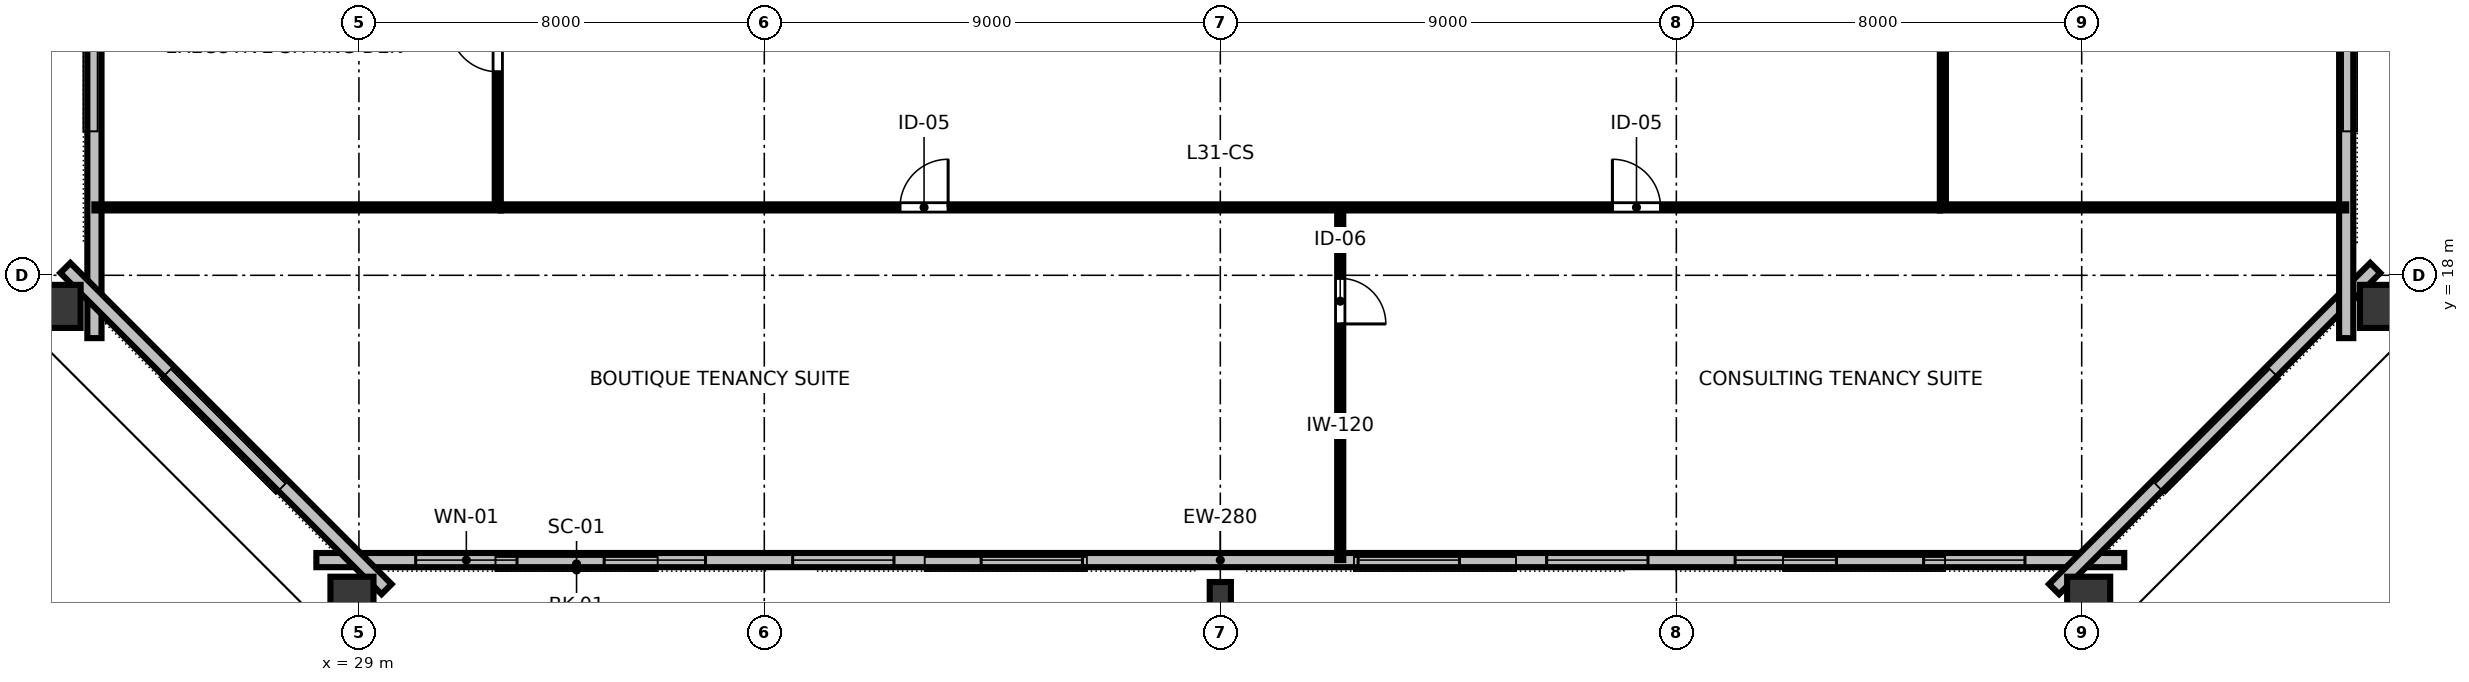
"""IFC4 building model, lengths in metres.
Left out: names, types, materials, properties, quantities, classifications, styles, units other than length and angle.
Written with IfcOpenShell. Run it as: python <this file> out.ifc"""

import sys

from ifc_helpers import new_model, si_unit, direction, frame, frame_2d, origin, origin_2d, place, context, subcontext, project, spatial, rectangle, hollow_rectangle, i_section, extrude, element, fill, save


model = new_model("IFC4")
c1 = context("Model", 3, precision=1e-05, world=origin(), true_north=direction((0.0, 1.0)))
c2 = subcontext(c1, "Body", "Model", "MODEL_VIEW")
j1 = project(units=[si_unit("LENGTHUNIT", "METRE"), si_unit("PLANEANGLEUNIT", "RADIAN")], contexts=[c1])
p1 = place(None, origin())
s1 = spatial("IfcSite", under=j1, at=p1, CompositionType="ELEMENT")
p2 = place(p1, origin())
s2 = spatial("IfcBuilding", under=s1, at=p2, CompositionType="ELEMENT")
p3 = place(p2, frame((0.0, 0.0, 120.4)))
s3 = spatial("IfcBuildingStorey", under=s2, at=p3, CompositionType="ELEMENT", Elevation=120.4)
p4 = place(p3, frame((28.863, 11.552, 0.0), z_axis=(0.0, 0.0, 1.0), x_axis=(1.0, 0.0, 0.0)))
e1 = element("IfcColumn", 1, at=p4, inside=s3, PredefinedType="COLUMN", context=c2, shape_type="SweptSolid", body=[
    extrude(hollow_rectangle(XDim=0.85, YDim=1.0, WallThickness=0.05, at=origin_2d()), origin(), (0.0, 0.0, 1.0), 3.358),
])
p5 = place(p3, frame((46.0, 11.72, 0.0), z_axis=(0.0, 0.0, 1.0), x_axis=(1.0, 0.0, 0.0)))
e2 = element("IfcColumn", 2, at=p5, inside=s3, PredefinedType="COLUMN", context=c2, shape_type="SweptSolid", body=[
    extrude(i_section(OverallWidth=0.418, OverallDepth=0.455, WebThickness=0.042, FlangeThickness=0.068, FilletRadius=0.025, at=origin_2d()), origin(), (0.0, 0.0, 1.0), 3.358),
])
for number, where, z_axis, x_axis in (
    (3, (63.137, 11.552, 0.0), (0.0, 0.0, 1.0), (1.0, 0.0, 0.0)),
    (4, (68.992, 17.386, 0.0), (0.0, 0.0, 1.0), (0.0, 1.0, 0.0)),
    (5, (23.008, 17.386, 0.0), (0.0, 0.0, 1.0), (0.0, 1.0, 0.0)),
):
    element("IfcColumn", number, at=place(p3, frame(where, z_axis=z_axis, x_axis=x_axis)), inside=s3, PredefinedType="COLUMN", context=c2, shape_type="SweptSolid", body=[
        extrude(hollow_rectangle(XDim=0.85, YDim=1.0, WallThickness=0.05, at=origin_2d()), origin(), (0.0, 0.0, 1.0), 3.358),
    ])
p6 = place(p3, frame((28.16, 12.38, 0.0), z_axis=(0.0, 0.0, 1.0), x_axis=(1.0, 0.0, 0.0)))
e6 = element("IfcWall", 6, at=p6, inside=s3, PredefinedType="STANDARD", context=c2, shape_type="SweptSolid", body=[
    extrude(rectangle(XDim=35.68, YDim=0.28, at=frame_2d((17.84, 0.0))), origin(), (0.0, 0.0, 1.0), 3.36),
])
p7 = place(p6, frame((1.96, 0.0, 0.8)))
e7 = element("IfcOpeningElement", 7, at=p7, cuts=e6, PredefinedType="OPENING", context=c2, shape_type="SweptSolid", body=[
    extrude(rectangle(XDim=2.0, YDim=1.95, at=frame_2d((1.0, 0.975))), frame((0.0, 0.15, 0.0), z_axis=(0.0, -1.0, 0.0), x_axis=(1.0, 0.0, 0.0)), (0.0, 0.0, 1.0), 0.3),
])
p8 = place(p6, frame((5.68, 0.0, 0.8)))
e8 = element("IfcOpeningElement", 8, at=p8, cuts=e6, PredefinedType="OPENING", context=c2, shape_type="SweptSolid", body=[
    extrude(rectangle(XDim=2.0, YDim=1.95, at=frame_2d((1.0, 0.975))), frame((0.0, 0.15, 0.0), z_axis=(0.0, -1.0, 0.0), x_axis=(1.0, 0.0, 0.0)), (0.0, 0.0, 1.0), 0.3),
])
p9 = place(p6, frame((9.4, 0.0, 0.8)))
e9 = element("IfcOpeningElement", 9, at=p9, cuts=e6, PredefinedType="OPENING", context=c2, shape_type="SweptSolid", body=[
    extrude(rectangle(XDim=2.0, YDim=1.95, at=frame_2d((1.0, 0.975))), frame((0.0, 0.15, 0.0), z_axis=(0.0, -1.0, 0.0), x_axis=(1.0, 0.0, 0.0)), (0.0, 0.0, 1.0), 0.3),
])
p10 = place(p6, frame((13.12, 0.0, 0.8)))
e10 = element("IfcOpeningElement", 10, at=p10, cuts=e6, PredefinedType="OPENING", context=c2, shape_type="SweptSolid", body=[
    extrude(rectangle(XDim=2.0, YDim=1.95, at=frame_2d((1.0, 0.975))), frame((0.0, 0.15, 0.0), z_axis=(0.0, -1.0, 0.0), x_axis=(1.0, 0.0, 0.0)), (0.0, 0.0, 1.0), 0.3),
])
p11 = place(p6, frame((20.56, 0.0, 0.8)))
e11 = element("IfcOpeningElement", 11, at=p11, cuts=e6, PredefinedType="OPENING", context=c2, shape_type="SweptSolid", body=[
    extrude(rectangle(XDim=2.0, YDim=1.95, at=frame_2d((1.0, 0.975))), frame((0.0, 0.15, 0.0), z_axis=(0.0, -1.0, 0.0), x_axis=(1.0, 0.0, 0.0)), (0.0, 0.0, 1.0), 0.3),
])
p12 = place(p6, frame((24.28, 0.0, 0.8)))
e12 = element("IfcOpeningElement", 12, at=p12, cuts=e6, PredefinedType="OPENING", context=c2, shape_type="SweptSolid", body=[
    extrude(rectangle(XDim=2.0, YDim=1.95, at=frame_2d((1.0, 0.975))), frame((0.0, 0.15, 0.0), z_axis=(0.0, -1.0, 0.0), x_axis=(1.0, 0.0, 0.0)), (0.0, 0.0, 1.0), 0.3),
])
p13 = place(p6, frame((28.0, 0.0, 0.8)))
e13 = element("IfcOpeningElement", 13, at=p13, cuts=e6, PredefinedType="OPENING", context=c2, shape_type="SweptSolid", body=[
    extrude(rectangle(XDim=2.0, YDim=1.95, at=frame_2d((1.0, 0.975))), frame((0.0, 0.15, 0.0), z_axis=(0.0, -1.0, 0.0), x_axis=(1.0, 0.0, 0.0)), (0.0, 0.0, 1.0), 0.3),
])
p14 = place(p6, frame((31.72, 0.0, 0.8)))
e14 = element("IfcOpeningElement", 14, at=p14, cuts=e6, PredefinedType="OPENING", context=c2, shape_type="SweptSolid", body=[
    extrude(rectangle(XDim=2.0, YDim=1.95, at=frame_2d((1.0, 0.975))), frame((0.0, 0.15, 0.0), z_axis=(0.0, -1.0, 0.0), x_axis=(1.0, 0.0, 0.0)), (0.0, 0.0, 1.0), 0.3),
])
p15 = place(p3, frame((62.455, 11.806, 0.0), z_axis=(0.0, 0.0, 1.0), x_axis=(0.707106781187, 0.707106781187, 0.0)))
e15 = element("IfcWall", 15, at=p15, inside=s3, PredefinedType="STANDARD", context=c2, shape_type="SweptSolid", body=[
    extrude(rectangle(XDim=8.965, YDim=0.28, at=frame_2d((4.482, 0.0))), origin(), (0.0, 0.0, 1.0), 3.36),
])
p16 = place(p3, frame((68.22, 16.76, 0.0), z_axis=(0.0, 0.0, 1.0), x_axis=(0.0, 1.0, 0.0)))
e16 = element("IfcWall", 16, at=p16, inside=s3, PredefinedType="STANDARD", context=c2, shape_type="SweptSolid", body=[
    extrude(rectangle(XDim=30.48, YDim=0.28, at=frame_2d((15.24, 0.0))), origin(), (0.0, 0.0, 1.0), 3.36),
])
p17 = place(p16, frame((6.16, 0.0, 0.8)))
e17 = element("IfcOpeningElement", 17, at=p17, cuts=e16, PredefinedType="OPENING", context=c2, shape_type="SweptSolid", body=[
    extrude(rectangle(XDim=2.0, YDim=1.95, at=frame_2d((1.0, 0.975))), frame((0.0, 0.15, 0.0), z_axis=(0.0, -1.0, 0.0), x_axis=(1.0, 0.0, 0.0)), (0.0, 0.0, 1.0), 0.3),
])
p18 = place(p16, frame((22.32, 0.0, 0.8)))
e18 = element("IfcOpeningElement", 18, at=p18, cuts=e16, PredefinedType="OPENING", context=c2, shape_type="SweptSolid", body=[
    extrude(rectangle(XDim=2.0, YDim=1.95, at=frame_2d((1.0, 0.975))), frame((0.0, 0.15, 0.0), z_axis=(0.0, -1.0, 0.0), x_axis=(1.0, 0.0, 0.0)), (0.0, 0.0, 1.0), 0.3),
])
p19 = place(p3, frame((23.78, 47.24, 0.0), z_axis=(0.0, 0.0, 1.0), x_axis=(0.0, -1.0, 0.0)))
e19 = element("IfcWall", 19, at=p19, inside=s3, PredefinedType="STANDARD", context=c2, shape_type="SweptSolid", body=[
    extrude(rectangle(XDim=30.48, YDim=0.28, at=frame_2d((15.24, 0.0))), origin(), (0.0, 0.0, 1.0), 3.36),
])
p20 = place(p19, frame((6.16, 0.0, 0.8)))
e20 = element("IfcOpeningElement", 20, at=p20, cuts=e19, PredefinedType="OPENING", context=c2, shape_type="SweptSolid", body=[
    extrude(rectangle(XDim=2.0, YDim=1.95, at=frame_2d((1.0, 0.975))), frame((0.0, 0.15, 0.0), z_axis=(0.0, -1.0, 0.0), x_axis=(1.0, 0.0, 0.0)), (0.0, 0.0, 1.0), 0.3),
])
p21 = place(p19, frame((18.28, 0.0, 0.8)))
e21 = element("IfcOpeningElement", 21, at=p21, cuts=e19, PredefinedType="OPENING", context=c2, shape_type="SweptSolid", body=[
    extrude(rectangle(XDim=2.0, YDim=1.95, at=frame_2d((1.0, 0.975))), frame((0.0, 0.15, 0.0), z_axis=(0.0, -1.0, 0.0), x_axis=(1.0, 0.0, 0.0)), (0.0, 0.0, 1.0), 0.3),
])
p22 = place(p19, frame((22.32, 0.0, 0.8)))
e22 = element("IfcOpeningElement", 22, at=p22, cuts=e19, PredefinedType="OPENING", context=c2, shape_type="SweptSolid", body=[
    extrude(rectangle(XDim=2.0, YDim=1.95, at=frame_2d((1.0, 0.975))), frame((0.0, 0.15, 0.0), z_axis=(0.0, -1.0, 0.0), x_axis=(1.0, 0.0, 0.0)), (0.0, 0.0, 1.0), 0.3),
])
p23 = place(p3, frame((23.206, 18.146, 0.0), z_axis=(0.0, 0.0, 1.0), x_axis=(0.707106781187, -0.707106781187, 0.0)))
e23 = element("IfcWall", 23, at=p23, inside=s3, PredefinedType="STANDARD", context=c2, shape_type="SweptSolid", body=[
    extrude(rectangle(XDim=8.965, YDim=0.28, at=frame_2d((4.482, 0.0))), origin(), (0.0, 0.0, 1.0), 3.36),
])
p24 = place(p3, frame((48.366, 19.34, 0.0), z_axis=(0.0, 0.0, 1.0), x_axis=(0.0, -1.0, 0.0)))
e24 = element("IfcWall", 24, at=p24, inside=s3, PredefinedType="PARTITIONING", context=c2, shape_type="SweptSolid", body=[
    extrude(rectangle(XDim=6.96, YDim=0.12, at=frame_2d((3.48, 0.0))), origin(), (0.0, 0.0, 1.0), 2.64),
])
p25 = place(p24, frame((1.4, 0.0, 0.0)))
e25 = element("IfcOpeningElement", 25, at=p25, cuts=e24, PredefinedType="OPENING", context=c2, shape_type="SweptSolid", body=[
    extrude(rectangle(XDim=0.9, YDim=2.15, at=frame_2d((0.45, 1.075))), frame((0.0, 0.07, 0.0), z_axis=(0.0, -1.0, 0.0), x_axis=(1.0, 0.0, 0.0)), (0.0, 0.0, 1.0), 0.14),
])
p26 = place(p3, frame((31.8, 19.34, 0.0), z_axis=(0.0, 0.0, 1.0), x_axis=(1.0, 0.0, 0.0)))
e26 = element("IfcWall", 26, at=p26, inside=s3, PredefinedType="PARTITIONING", context=c2, shape_type="SweptSolid", body=[
    extrude(rectangle(XDim=28.4, YDim=0.12, at=frame_2d((14.2, 0.0))), origin(), (0.0, 0.0, 1.0), 2.64),
])
p27 = place(p26, frame((7.878, 0.0, 0.0)))
e27 = element("IfcOpeningElement", 27, at=p27, cuts=e26, PredefinedType="OPENING", context=c2, shape_type="SweptSolid", body=[
    extrude(rectangle(XDim=0.95, YDim=2.15, at=frame_2d((0.475, 1.075))), frame((0.0, 0.07, 0.0), z_axis=(0.0, -1.0, 0.0), x_axis=(1.0, 0.0, 0.0)), (0.0, 0.0, 1.0), 0.14),
])
p28 = place(p26, frame((21.938, 0.0, 0.0)))
e28 = element("IfcOpeningElement", 28, at=p28, cuts=e26, PredefinedType="OPENING", context=c2, shape_type="SweptSolid", body=[
    extrude(rectangle(XDim=0.95, YDim=2.15, at=frame_2d((0.475, 1.075))), frame((0.0, 0.07, 0.0), z_axis=(0.0, -1.0, 0.0), x_axis=(1.0, 0.0, 0.0)), (0.0, 0.0, 1.0), 0.14),
])
p29 = place(p3, frame((31.74, 19.4, 0.0), z_axis=(0.0, 0.0, 1.0), x_axis=(0.0, 1.0, 0.0)))
e29 = element("IfcWall", 29, at=p29, inside=s3, PredefinedType="PARTITIONING", context=c2, shape_type="SweptSolid", body=[
    extrude(rectangle(XDim=11.58, YDim=0.12, at=frame_2d((5.79, 0.0))), origin(), (0.0, 0.0, 1.0), 2.64),
])
p30 = place(p29, frame((2.616, 0.0, 0.0)))
e30 = element("IfcOpeningElement", 30, at=p30, cuts=e29, PredefinedType="OPENING", context=c2, shape_type="SweptSolid", body=[
    extrude(rectangle(XDim=0.95, YDim=2.15, at=frame_2d((0.475, 1.075))), frame((0.0, 0.07, 0.0), z_axis=(0.0, -1.0, 0.0), x_axis=(1.0, 0.0, 0.0)), (0.0, 0.0, 1.0), 0.14),
])
p31 = place(p29, frame((8.306, 0.0, 0.0)))
e31 = element("IfcOpeningElement", 31, at=p31, cuts=e29, PredefinedType="OPENING", context=c2, shape_type="SweptSolid", body=[
    extrude(rectangle(XDim=0.95, YDim=2.15, at=frame_2d((0.475, 1.075))), frame((0.0, 0.07, 0.0), z_axis=(0.0, -1.0, 0.0), x_axis=(1.0, 0.0, 0.0)), (0.0, 0.0, 1.0), 0.14),
])
p32 = place(p3, frame((60.26, 19.4, 0.0), z_axis=(0.0, 0.0, 1.0), x_axis=(0.0, 1.0, 0.0)))
e32 = element("IfcWall", 32, at=p32, inside=s3, PredefinedType="PARTITIONING", context=c2, shape_type="SweptSolid", body=[
    extrude(rectangle(XDim=11.58, YDim=0.12, at=frame_2d((5.79, 0.0))), origin(), (0.0, 0.0, 1.0), 2.64),
])
p33 = place(p32, frame((4.246, 0.0, 0.0)))
e33 = element("IfcOpeningElement", 33, at=p33, cuts=e32, PredefinedType="OPENING", context=c2, shape_type="SweptSolid", body=[
    extrude(rectangle(XDim=0.95, YDim=2.15, at=frame_2d((0.475, 1.075))), frame((0.0, 0.07, 0.0), z_axis=(0.0, -1.0, 0.0), x_axis=(1.0, 0.0, 0.0)), (0.0, 0.0, 1.0), 0.14),
])
p34 = place(p32, frame((9.936, 0.0, 0.0)))
e34 = element("IfcOpeningElement", 34, at=p34, cuts=e32, PredefinedType="OPENING", context=c2, shape_type="SweptSolid", body=[
    extrude(rectangle(XDim=0.95, YDim=2.15, at=frame_2d((0.475, 1.075))), frame((0.0, 0.07, 0.0), z_axis=(0.0, -1.0, 0.0), x_axis=(1.0, 0.0, 0.0)), (0.0, 0.0, 1.0), 0.14),
])
for number, where, z_axis, x_axis in (
    (35, (31.8, 19.34, 0.0), (0.0, 0.0, 1.0), (-1.0, 0.0, 0.0)),
    (36, (60.2, 19.34, 0.0), (0.0, 0.0, 1.0), (1.0, 0.0, 0.0)),
):
    element("IfcWall", number, at=place(p3, frame(where, z_axis=z_axis, x_axis=x_axis)), inside=s3, PredefinedType="PARTITIONING", context=c2, shape_type="SweptSolid", body=[
        extrude(rectangle(XDim=8.02, YDim=0.12, at=frame_2d((4.01, 0.0))), origin(), (0.0, 0.0, 1.0), 2.64),
    ])
p35 = place(p7, origin())
e37 = element("IfcWindow", 37, at=p35, inside=s3, PartitioningType="SINGLE_PANEL", PredefinedType="WINDOW", context=c2, shape_type="SweptSolid", body=[
    extrude(rectangle(XDim=2.0, YDim=1.95, at=frame_2d((1.0, 0.975))), frame((0.0, 0.03, 0.0), z_axis=(0.0, -1.0, 0.0), x_axis=(1.0, 0.0, 0.0)), (0.0, 0.0, 1.0), 0.06),
])
fill(e7, e37)
p36 = place(p8, origin())
e38 = element("IfcWindow", 38, at=p36, inside=s3, PartitioningType="SINGLE_PANEL", PredefinedType="WINDOW", context=c2, shape_type="SweptSolid", body=[
    extrude(rectangle(XDim=2.0, YDim=1.95, at=frame_2d((1.0, 0.975))), frame((0.0, 0.03, 0.0), z_axis=(0.0, -1.0, 0.0), x_axis=(1.0, 0.0, 0.0)), (0.0, 0.0, 1.0), 0.06),
])
fill(e8, e38)
p37 = place(p9, origin())
e39 = element("IfcWindow", 39, at=p37, inside=s3, PartitioningType="SINGLE_PANEL", PredefinedType="WINDOW", context=c2, shape_type="SweptSolid", body=[
    extrude(rectangle(XDim=2.0, YDim=1.95, at=frame_2d((1.0, 0.975))), frame((0.0, 0.03, 0.0), z_axis=(0.0, -1.0, 0.0), x_axis=(1.0, 0.0, 0.0)), (0.0, 0.0, 1.0), 0.06),
])
fill(e9, e39)
p38 = place(p10, origin())
e40 = element("IfcWindow", 40, at=p38, inside=s3, PartitioningType="SINGLE_PANEL", PredefinedType="WINDOW", context=c2, shape_type="SweptSolid", body=[
    extrude(rectangle(XDim=2.0, YDim=1.95, at=frame_2d((1.0, 0.975))), frame((0.0, 0.03, 0.0), z_axis=(0.0, -1.0, 0.0), x_axis=(1.0, 0.0, 0.0)), (0.0, 0.0, 1.0), 0.06),
])
fill(e10, e40)
p39 = place(p11, origin())
e41 = element("IfcWindow", 41, at=p39, inside=s3, PartitioningType="SINGLE_PANEL", PredefinedType="WINDOW", context=c2, shape_type="SweptSolid", body=[
    extrude(rectangle(XDim=2.0, YDim=1.95, at=frame_2d((1.0, 0.975))), frame((0.0, 0.03, 0.0), z_axis=(0.0, -1.0, 0.0), x_axis=(1.0, 0.0, 0.0)), (0.0, 0.0, 1.0), 0.06),
])
fill(e11, e41)
p40 = place(p12, origin())
e42 = element("IfcWindow", 42, at=p40, inside=s3, PartitioningType="SINGLE_PANEL", PredefinedType="WINDOW", context=c2, shape_type="SweptSolid", body=[
    extrude(rectangle(XDim=2.0, YDim=1.95, at=frame_2d((1.0, 0.975))), frame((0.0, 0.03, 0.0), z_axis=(0.0, -1.0, 0.0), x_axis=(1.0, 0.0, 0.0)), (0.0, 0.0, 1.0), 0.06),
])
fill(e12, e42)
p41 = place(p13, origin())
e43 = element("IfcWindow", 43, at=p41, inside=s3, PartitioningType="SINGLE_PANEL", PredefinedType="WINDOW", context=c2, shape_type="SweptSolid", body=[
    extrude(rectangle(XDim=2.0, YDim=1.95, at=frame_2d((1.0, 0.975))), frame((0.0, 0.03, 0.0), z_axis=(0.0, -1.0, 0.0), x_axis=(1.0, 0.0, 0.0)), (0.0, 0.0, 1.0), 0.06),
])
fill(e13, e43)
p42 = place(p14, origin())
e44 = element("IfcWindow", 44, at=p42, inside=s3, PartitioningType="SINGLE_PANEL", PredefinedType="WINDOW", context=c2, shape_type="SweptSolid", body=[
    extrude(rectangle(XDim=2.0, YDim=1.95, at=frame_2d((1.0, 0.975))), frame((0.0, 0.03, 0.0), z_axis=(0.0, -1.0, 0.0), x_axis=(1.0, 0.0, 0.0)), (0.0, 0.0, 1.0), 0.06),
])
fill(e14, e44)
p43 = place(p25, origin())
e45 = element("IfcDoor", 45, at=p43, inside=s3, OperationType="SINGLE_SWING_RIGHT", PredefinedType="DOOR", context=c2, shape_type="SweptSolid", body=[
    extrude(rectangle(XDim=0.9, YDim=2.15, at=frame_2d((0.45, 1.075))), frame((0.0, 0.025, 0.0), z_axis=(0.0, -1.0, 0.0), x_axis=(1.0, 0.0, 0.0)), (0.0, 0.0, 1.0), 0.05),
])
fill(e25, e45)
p44 = place(p27, origin())
e46 = element("IfcDoor", 46, at=p44, inside=s3, OperationType="SINGLE_SWING_RIGHT", PredefinedType="DOOR", context=c2, shape_type="SweptSolid", body=[
    extrude(rectangle(XDim=0.95, YDim=2.15, at=frame_2d((0.475, 1.075))), frame((0.0, 0.025, 0.0), z_axis=(0.0, -1.0, 0.0), x_axis=(1.0, 0.0, 0.0)), (0.0, 0.0, 1.0), 0.05),
])
fill(e27, e46)
p45 = place(p28, origin())
e47 = element("IfcDoor", 47, at=p45, inside=s3, OperationType="SINGLE_SWING_LEFT", PredefinedType="DOOR", context=c2, shape_type="SweptSolid", body=[
    extrude(rectangle(XDim=0.95, YDim=2.15, at=frame_2d((0.475, 1.075))), frame((0.0, 0.025, 0.0), z_axis=(0.0, -1.0, 0.0), x_axis=(1.0, 0.0, 0.0)), (0.0, 0.0, 1.0), 0.05),
])
fill(e28, e47)
p46 = place(p30, origin())
e48 = element("IfcDoor", 48, at=p46, inside=s3, OperationType="SINGLE_SWING_RIGHT", PredefinedType="DOOR", context=c2, shape_type="SweptSolid", body=[
    extrude(rectangle(XDim=0.95, YDim=2.15, at=frame_2d((0.475, 1.075))), frame((0.0, 0.025, 0.0), z_axis=(0.0, -1.0, 0.0), x_axis=(1.0, 0.0, 0.0)), (0.0, 0.0, 1.0), 0.05),
])
fill(e30, e48)
save(model, sys.argv[1])
